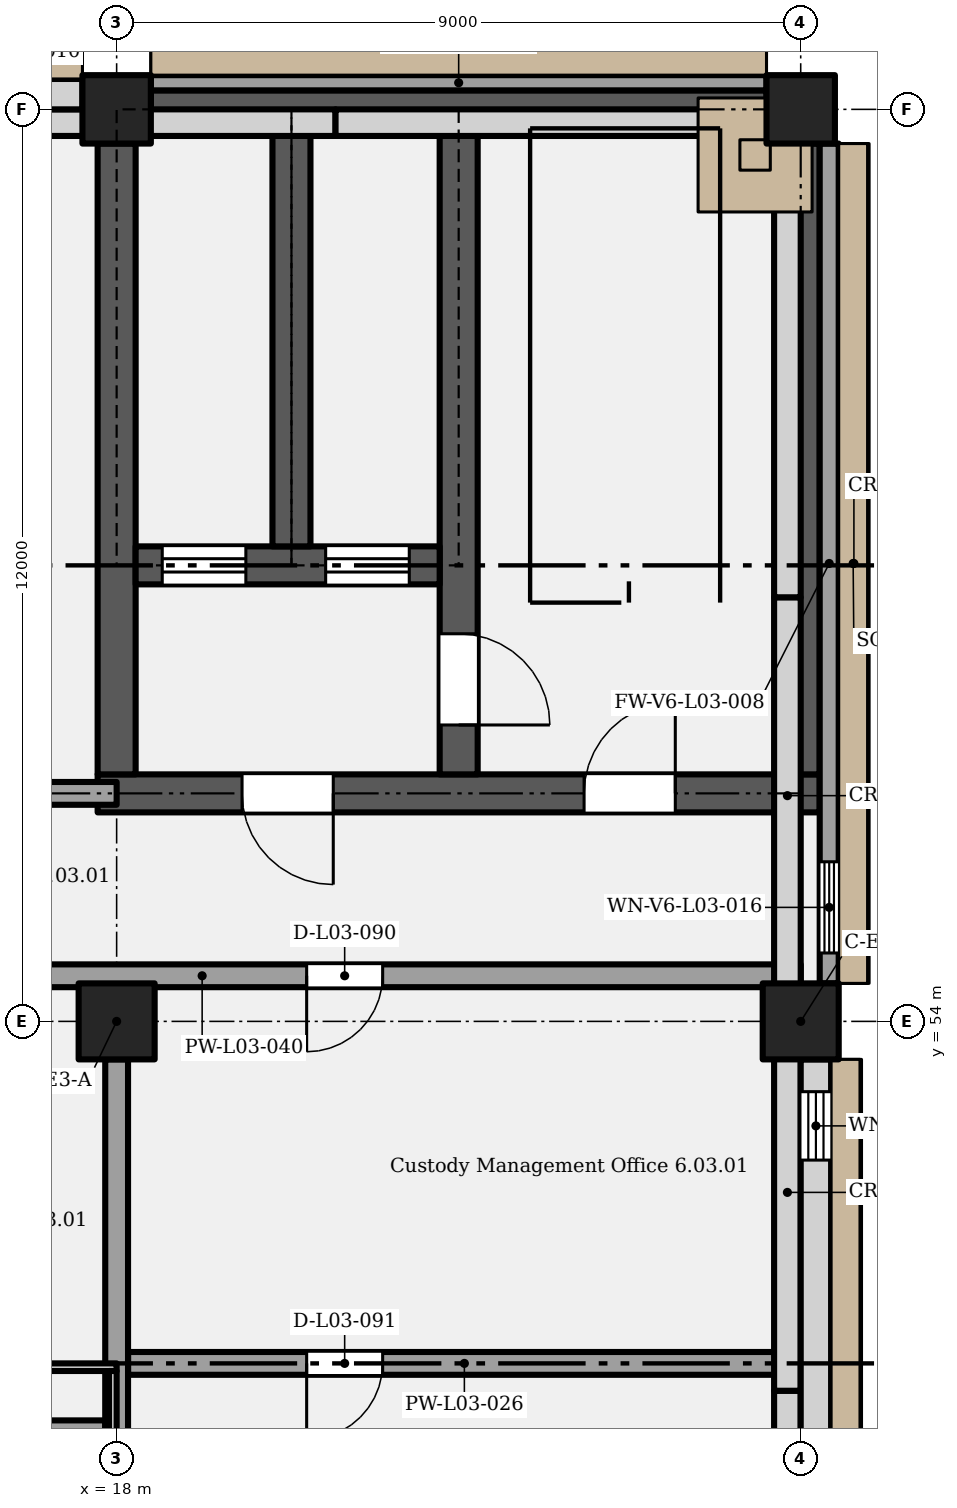
"""IFC4 building model, lengths in metres.
Left out: names, types, materials, properties, quantities, classifications, styles, units other than length and angle.
Written with IfcOpenShell. Run it as: python <this file> out.ifc"""

import sys

from ifc_helpers import new_model, si_unit, direction, frame, frame_2d, origin, origin_2d, place, context, subcontext, project, spatial, rectangle, extrude, element, fill, save


model = new_model("IFC4")
c1 = context("Model", 3, precision=1e-05, world=origin(), true_north=direction((0.0, 1.0)))
c2 = subcontext(c1, "Body", "Model", "MODEL_VIEW")
j1 = project(units=[si_unit("LENGTHUNIT", "METRE"), si_unit("PLANEANGLEUNIT", "RADIAN")], contexts=[c1])
p1 = place(None, origin())
s1 = spatial("IfcSite", under=j1, at=p1, CompositionType="ELEMENT")
p2 = place(p1, origin())
s2 = spatial("IfcBuilding", under=s1, at=p2, CompositionType="ELEMENT")
p3 = place(p2, frame((0.0, 0.0, 17.4)))
s3 = spatial("IfcBuildingStorey", under=s2, at=p3, CompositionType="ELEMENT", Elevation=17.4)
for number, where, z_axis, x_axis in (
    (1, (18.0, 54.0, 0.0), (0.0, 0.0, 1.0), (1.0, 0.0, 0.0)),
    (2, (27.0, 54.0, 0.0), (0.0, 0.0, 1.0), (1.0, 0.0, 0.0)),
):
    element("IfcColumn", number, at=place(p3, frame(where, z_axis=z_axis, x_axis=x_axis)), inside=s3, PredefinedType="COLUMN", context=c2, shape_type="SweptSolid", body=[
        extrude(rectangle(XDim=1.0, YDim=1.0, at=origin_2d()), origin(), (0.0, 0.0, 1.0), 5.4),
    ])
for number, where, z_axis, x_axis in (
    (3, (18.0, 66.0, 0.0), (0.0, 0.0, 1.0), (1.0, 0.0, 0.0)),
    (4, (27.0, 66.0, 0.0), (0.0, 0.0, 1.0), (1.0, 0.0, 0.0)),
):
    element("IfcColumn", number, at=place(p3, frame(where, z_axis=z_axis, x_axis=x_axis)), inside=s3, PredefinedType="COLUMN", context=c2, shape_type="SweptSolid", body=[
        extrude(rectangle(XDim=0.9, YDim=0.9, at=origin_2d()), origin(), (0.0, 0.0, 1.0), 5.4),
    ])
p4 = place(p3, frame((17.75, 57.0, 0.0), z_axis=(0.0, 0.0, 1.0), x_axis=(1.0, 0.0, 0.0)))
e5 = element("IfcWall", 5, at=p4, inside=s3, PredefinedType="SHEAR", context=c2, shape_type="SweptSolid", body=[
    extrude(rectangle(XDim=9.5, YDim=0.5, at=frame_2d((4.75, 0.0))), origin(), (0.0, 0.0, 1.0), 5.15),
])
p5 = place(p4, frame((3.1, 0.0, 0.0), z_axis=(0.0, 0.0, 1.0), x_axis=(-1.0, 0.0, 0.0)))
e6 = element("IfcOpeningElement", 6, at=p5, cuts=e5, PredefinedType="OPENING", context=c2, shape_type="SweptSolid", body=[
    extrude(rectangle(XDim=1.2, YDim=2.1, at=frame_2d((0.6, 1.05))), frame((0.0, 0.26, 0.0), z_axis=(0.0, -1.0, 0.0), x_axis=(1.0, 0.0, 0.0)), (0.0, 0.0, 1.0), 0.52),
])
p6 = place(p4, frame((6.4, 0.0, 0.0)))
e7 = element("IfcOpeningElement", 7, at=p6, cuts=e5, PredefinedType="OPENING", context=c2, shape_type="SweptSolid", body=[
    extrude(rectangle(XDim=1.2, YDim=2.1, at=frame_2d((0.6, 1.05))), frame((0.0, 0.26, 0.0), z_axis=(0.0, -1.0, 0.0), x_axis=(1.0, 0.0, 0.0)), (0.0, 0.0, 1.0), 0.52),
])
p7 = place(p3, frame((18.0, 57.25, 0.0), z_axis=(0.0, 0.0, 1.0), x_axis=(0.0, 1.0, 0.0)))
e8 = element("IfcWall", 8, at=p7, inside=s3, PredefinedType="SHEAR", context=c2, shape_type="SweptSolid", body=[
    extrude(rectangle(XDim=8.3, YDim=0.5, at=frame_2d((4.15, 0.0))), origin(), (0.0, 0.0, 1.0), 5.15),
])
p8 = place(p3, frame((22.5, 57.25, 0.0), z_axis=(0.0, 0.0, 1.0), x_axis=(0.0, 1.0, 0.0)))
e9 = element("IfcWall", 9, at=p8, inside=s3, PredefinedType="SHEAR", context=c2, shape_type="SweptSolid", body=[
    extrude(rectangle(XDim=8.5, YDim=0.5, at=frame_2d((4.25, 0.0))), origin(), (0.0, 0.0, 1.0), 5.15),
])
p9 = place(p8, frame((1.85, 0.0, 0.0), z_axis=(0.0, 0.0, 1.0), x_axis=(-1.0, 0.0, 0.0)))
e10 = element("IfcOpeningElement", 10, at=p9, cuts=e9, PredefinedType="OPENING", context=c2, shape_type="SweptSolid", body=[
    extrude(rectangle(XDim=1.2, YDim=2.1, at=frame_2d((0.6, 1.05))), frame((0.0, 0.26, 0.0), z_axis=(0.0, -1.0, 0.0), x_axis=(1.0, 0.0, 0.0)), (0.0, 0.0, 1.0), 0.52),
])
p10 = place(p3, frame((27.0, 57.25, 0.0), z_axis=(0.0, 0.0, 1.0), x_axis=(0.0, 1.0, 0.0)))
e11 = element("IfcWall", 11, at=p10, inside=s3, PredefinedType="SHEAR", context=c2, shape_type="SweptSolid", body=[
    extrude(rectangle(XDim=8.3, YDim=0.5, at=frame_2d((4.15, 0.0))), origin(), (0.0, 0.0, 1.0), 5.15),
])
p11 = place(p3, frame((18.25, 60.0, 0.0), z_axis=(0.0, 0.0, 1.0), x_axis=(1.0, 0.0, 0.0)))
e12 = element("IfcWall", 12, at=p11, inside=s3, PredefinedType="SHEAR", context=c2, shape_type="SweptSolid", body=[
    extrude(rectangle(XDim=4.0, YDim=0.5, at=frame_2d((2.0, 0.0))), origin(), (0.0, 0.0, 1.0), 5.15),
])
p12 = place(p11, frame((0.35, 0.0, 0.0)))
e13 = element("IfcOpeningElement", 13, at=p12, cuts=e12, PredefinedType="OPENING", context=c2, shape_type="SweptSolid", body=[
    extrude(rectangle(XDim=1.1, YDim=2.1, at=frame_2d((0.55, 1.05))), frame((0.0, 0.26, 0.0), z_axis=(0.0, -1.0, 0.0), x_axis=(1.0, 0.0, 0.0)), (0.0, 0.0, 1.0), 0.52),
])
p13 = place(p11, frame((2.5, 0.0, 0.0)))
e14 = element("IfcOpeningElement", 14, at=p13, cuts=e12, PredefinedType="OPENING", context=c2, shape_type="SweptSolid", body=[
    extrude(rectangle(XDim=1.1, YDim=2.1, at=frame_2d((0.55, 1.05))), frame((0.0, 0.26, 0.0), z_axis=(0.0, -1.0, 0.0), x_axis=(1.0, 0.0, 0.0)), (0.0, 0.0, 1.0), 0.52),
])
p14 = place(p3, frame((20.3, 60.25, 0.0), z_axis=(0.0, 0.0, 1.0), x_axis=(0.0, 1.0, 0.0)))
e15 = element("IfcWall", 15, at=p14, inside=s3, PredefinedType="SHEAR", context=c2, shape_type="SweptSolid", body=[
    extrude(rectangle(XDim=5.5, YDim=0.5, at=frame_2d((2.75, 0.0))), origin(), (0.0, 0.0, 1.0), 5.15),
])
p15 = place(p3, frame((18.45, 66.0, 0.0), z_axis=(0.0, 0.0, 1.0), x_axis=(1.0, 0.0, 0.0)))
e16 = element("IfcWall", 16, at=p15, inside=s3, PredefinedType="SHEAR", context=c2, shape_type="SweptSolid", body=[
    extrude(rectangle(XDim=8.1, YDim=0.5, at=frame_2d((4.05, 0.0))), origin(), (0.0, 0.0, 1.0), 5.15),
])
p16 = place(p3, frame((9.45, 66.2, 0.0), z_axis=(0.0, 0.0, 1.0), x_axis=(1.0, 0.0, 0.0)))
e17 = element("IfcWall", 17, at=p16, inside=s3, PredefinedType="SOLIDWALL", context=c2, shape_type="SweptSolid", body=[
    extrude(rectangle(XDim=8.1, YDim=0.4, at=frame_2d((4.05, 0.0))), origin(), (0.0, 0.0, 1.0), 5.15),
])
p17 = place(p16, frame((0.6, 0.0, 1.5)))
e18 = element("IfcOpeningElement", 18, at=p17, cuts=e17, PredefinedType="OPENING", context=c2, shape_type="SweptSolid", body=[
    extrude(rectangle(XDim=0.9, YDim=1.8, at=frame_2d((0.45, 0.9))), frame((0.0, 0.21, 0.0), z_axis=(0.0, -1.0, 0.0), x_axis=(1.0, 0.0, 0.0)), (0.0, 0.0, 1.0), 0.42),
])
p18 = place(p16, frame((3.6, 0.0, 1.5)))
e19 = element("IfcOpeningElement", 19, at=p18, cuts=e17, PredefinedType="OPENING", context=c2, shape_type="SweptSolid", body=[
    extrude(rectangle(XDim=0.9, YDim=1.8, at=frame_2d((0.45, 0.9))), frame((0.0, 0.21, 0.0), z_axis=(0.0, -1.0, 0.0), x_axis=(1.0, 0.0, 0.0)), (0.0, 0.0, 1.0), 0.42),
])
p19 = place(p16, frame((6.6, 0.0, 1.5)))
e20 = element("IfcOpeningElement", 20, at=p19, cuts=e17, PredefinedType="OPENING", context=c2, shape_type="SweptSolid", body=[
    extrude(rectangle(XDim=0.9, YDim=1.8, at=frame_2d((0.45, 0.9))), frame((0.0, 0.21, 0.0), z_axis=(0.0, -1.0, 0.0), x_axis=(1.0, 0.0, 0.0)), (0.0, 0.0, 1.0), 0.42),
])
p20 = place(p3, frame((18.45, 66.35, 0.0), z_axis=(0.0, 0.0, 1.0), x_axis=(1.0, 0.0, 0.0)))
e21 = element("IfcWall", 21, at=p20, inside=s3, PredefinedType="SOLIDWALL", context=c2, shape_type="SweptSolid", body=[
    extrude(rectangle(XDim=8.1, YDim=0.2, at=frame_2d((4.05, 0.0))), origin(), (0.0, 0.0, 1.0), 5.15),
])
p21 = place(p3, frame((27.2, 38.0, 0.0), z_axis=(0.0, 0.0, 1.0), x_axis=(0.0, 1.0, 0.0)))
e22 = element("IfcWall", 22, at=p21, inside=s3, PredefinedType="SOLIDWALL", context=c2, shape_type="SweptSolid", body=[
    extrude(rectangle(XDim=15.5, YDim=0.4, at=frame_2d((7.75, 0.0))), origin(), (0.0, 0.0, 1.0), 5.15),
])
p22 = place(p21, frame((0.425, 0.0, 1.5)))
e23 = element("IfcOpeningElement", 23, at=p22, cuts=e22, PredefinedType="OPENING", context=c2, shape_type="SweptSolid", body=[
    extrude(rectangle(XDim=0.9, YDim=1.8, at=frame_2d((0.45, 0.9))), frame((0.0, 0.21, 0.0), z_axis=(0.0, -1.0, 0.0), x_axis=(1.0, 0.0, 0.0)), (0.0, 0.0, 1.0), 0.42),
])
p23 = place(p21, frame((3.175, 0.0, 1.5)))
e24 = element("IfcOpeningElement", 24, at=p23, cuts=e22, PredefinedType="OPENING", context=c2, shape_type="SweptSolid", body=[
    extrude(rectangle(XDim=0.9, YDim=1.8, at=frame_2d((0.45, 0.9))), frame((0.0, 0.21, 0.0), z_axis=(0.0, -1.0, 0.0), x_axis=(1.0, 0.0, 0.0)), (0.0, 0.0, 1.0), 0.42),
])
p24 = place(p21, frame((5.845, 0.0, 1.5)))
e25 = element("IfcOpeningElement", 25, at=p24, cuts=e22, PredefinedType="OPENING", context=c2, shape_type="SweptSolid", body=[
    extrude(rectangle(XDim=0.9, YDim=1.8, at=frame_2d((0.45, 0.9))), frame((0.0, 0.21, 0.0), z_axis=(0.0, -1.0, 0.0), x_axis=(1.0, 0.0, 0.0)), (0.0, 0.0, 1.0), 0.42),
])
p25 = place(p21, frame((8.675, 0.0, 1.5)))
e26 = element("IfcOpeningElement", 26, at=p25, cuts=e22, PredefinedType="OPENING", context=c2, shape_type="SweptSolid", body=[
    extrude(rectangle(XDim=0.9, YDim=1.8, at=frame_2d((0.45, 0.9))), frame((0.0, 0.21, 0.0), z_axis=(0.0, -1.0, 0.0), x_axis=(1.0, 0.0, 0.0)), (0.0, 0.0, 1.0), 0.42),
])
p26 = place(p21, frame((14.175, 0.0, 1.5)))
e27 = element("IfcOpeningElement", 27, at=p26, cuts=e22, PredefinedType="OPENING", context=c2, shape_type="SweptSolid", body=[
    extrude(rectangle(XDim=0.9, YDim=1.8, at=frame_2d((0.45, 0.9))), frame((0.0, 0.21, 0.0), z_axis=(0.0, -1.0, 0.0), x_axis=(1.0, 0.0, 0.0)), (0.0, 0.0, 1.0), 0.42),
])
p27 = place(p3, frame((27.375, 54.5, 0.0), z_axis=(0.0, 0.0, 1.0), x_axis=(0.0, 1.0, 0.0)))
e28 = element("IfcWall", 28, at=p27, inside=s3, PredefinedType="SOLIDWALL", context=c2, shape_type="SweptSolid", body=[
    extrude(rectangle(XDim=11.05, YDim=0.25, at=frame_2d((5.525, 0.0))), origin(), (0.0, 0.0, 1.0), 5.15),
])
p28 = place(p27, frame((0.4, 0.0, 0.9)))
e29 = element("IfcOpeningElement", 29, at=p28, cuts=e28, PredefinedType="OPENING", context=c2, shape_type="SweptSolid", body=[
    extrude(rectangle(XDim=1.2, YDim=2.4, at=frame_2d((0.6, 1.2))), frame((0.0, 0.135, 0.0), z_axis=(0.0, -1.0, 0.0), x_axis=(1.0, 0.0, 0.0)), (0.0, 0.0, 1.0), 0.27),
])
p29 = place(p3, frame((25.8, 65.4, 5.4), z_axis=(0.0, 0.0, 1.0), x_axis=(1.0, 0.0, 0.0)))
e30 = element("IfcWall", 30, at=p29, inside=s3, PredefinedType="SOLIDWALL", context=c2, shape_type="SweptSolid", body=[
    extrude(rectangle(XDim=1.2, YDim=1.2, at=frame_2d((0.6, 0.0))), origin(), (0.0, 0.0, 1.0), 2.4),
])
p30 = place(p3, frame((15.96, 65.825, 5.4), z_axis=(0.0, 0.0, 1.0), x_axis=(1.0, 0.0, 0.0)))
e31 = element("IfcWall", 31, at=p30, inside=s3, PredefinedType="PARAPET", context=c2, shape_type="SweptSolid", body=[
    extrude(rectangle(XDim=4.92, YDim=0.35, at=frame_2d((2.46, 0.0))), origin(), (0.0, 0.0, 1.0), 1.5),
])
p31 = place(p3, frame((20.88, 65.825, 5.4), z_axis=(0.0, 0.0, 1.0), x_axis=(1.0, 0.0, 0.0)))
e32 = element("IfcWall", 32, at=p31, inside=s3, PredefinedType="PARAPET", context=c2, shape_type="SweptSolid", body=[
    extrude(rectangle(XDim=4.92, YDim=0.35, at=frame_2d((2.46, 0.0))), origin(), (0.0, 0.0, 1.0), 1.2),
])
p32 = place(p3, frame((26.825, 43.92, 5.4), z_axis=(0.0, 0.0, 1.0), x_axis=(0.0, 1.0, 0.0)))
e33 = element("IfcWall", 33, at=p32, inside=s3, PredefinedType="PARAPET", context=c2, shape_type="SweptSolid", body=[
    extrude(rectangle(XDim=5.22, YDim=0.35, at=frame_2d((2.61, 0.0))), origin(), (0.0, 0.0, 1.0), 1.5),
])
p33 = place(p3, frame((26.825, 49.14, 5.4), z_axis=(0.0, 0.0, 1.0), x_axis=(0.0, 1.0, 0.0)))
e34 = element("IfcWall", 34, at=p33, inside=s3, PredefinedType="PARAPET", context=c2, shape_type="SweptSolid", body=[
    extrude(rectangle(XDim=5.22, YDim=0.35, at=frame_2d((2.61, 0.0))), origin(), (0.0, 0.0, 1.0), 1.8),
])
p34 = place(p3, frame((26.825, 54.36, 5.4), z_axis=(0.0, 0.0, 1.0), x_axis=(0.0, 1.0, 0.0)))
e35 = element("IfcWall", 35, at=p34, inside=s3, PredefinedType="PARAPET", context=c2, shape_type="SweptSolid", body=[
    extrude(rectangle(XDim=5.22, YDim=0.35, at=frame_2d((2.61, 0.0))), origin(), (0.0, 0.0, 1.0), 1.5),
])
p35 = place(p3, frame((26.825, 59.58, 5.4), z_axis=(0.0, 0.0, 1.0), x_axis=(0.0, 1.0, 0.0)))
e36 = element("IfcWall", 36, at=p35, inside=s3, PredefinedType="PARAPET", context=c2, shape_type="SweptSolid", body=[
    extrude(rectangle(XDim=5.22, YDim=0.35, at=frame_2d((2.61, 0.0))), origin(), (0.0, 0.0, 1.0), 1.2),
])
p36 = place(p3, frame((9.0, 49.45, 5.4), z_axis=(0.0, 0.0, 1.0), x_axis=(1.0, 0.0, 0.0)))
e37 = element("IfcWall", 37, at=p36, inside=s3, PredefinedType="SOLIDWALL", context=c2, shape_type="SweptSolid", body=[
    extrude(rectangle(XDim=9.0, YDim=0.1, at=frame_2d((4.5, 0.0))), origin(), (0.0, 0.0, 1.0), 2.4),
])
p37 = place(p3, frame((17.95, 40.5, 5.4), z_axis=(0.0, 0.0, 1.0), x_axis=(0.0, 1.0, 0.0)))
e38 = element("IfcWall", 38, at=p37, inside=s3, PredefinedType="SOLIDWALL", context=c2, shape_type="SweptSolid", body=[
    extrude(rectangle(XDim=8.9, YDim=0.1, at=frame_2d((4.45, 0.0))), origin(), (0.0, 0.0, 1.0), 2.4),
])
p38 = place(p3, frame((11.55, 48.6, 0.0), z_axis=(0.0, 0.0, 1.0), x_axis=(1.0, 0.0, 0.0)))
e39 = element("IfcWall", 39, at=p38, inside=s3, PredefinedType="PARTITIONING", context=c2, shape_type="SweptSolid", body=[
    extrude(rectangle(XDim=6.3, YDim=0.3, at=frame_2d((3.15, 0.0))), origin(), (0.0, 0.0, 1.0), 5.15),
])
p39 = place(p3, frame((18.15, 49.5, 0.0), z_axis=(0.0, 0.0, 1.0), x_axis=(1.0, 0.0, 0.0)))
e40 = element("IfcWall", 40, at=p39, inside=s3, PredefinedType="PARTITIONING", context=c2, shape_type="SweptSolid", body=[
    extrude(rectangle(XDim=8.85, YDim=0.3, at=frame_2d((4.425, 0.0))), origin(), (0.0, 0.0, 1.0), 5.15),
])
p40 = place(p39, frame((3.35, 0.0, 0.0), z_axis=(0.0, 0.0, 1.0), x_axis=(-1.0, 0.0, 0.0)))
e41 = element("IfcOpeningElement", 41, at=p40, cuts=e40, PredefinedType="OPENING", context=c2, shape_type="SweptSolid", body=[
    extrude(rectangle(XDim=1.0, YDim=2.1, at=frame_2d((0.5, 1.05))), frame((0.0, 0.16, 0.0), z_axis=(0.0, -1.0, 0.0), x_axis=(1.0, 0.0, 0.0)), (0.0, 0.0, 1.0), 0.32),
])
p41 = place(p3, frame((11.25, 54.6, 0.0), z_axis=(0.0, 0.0, 1.0), x_axis=(1.0, 0.0, 0.0)))
e42 = element("IfcWall", 42, at=p41, inside=s3, PredefinedType="PARTITIONING", context=c2, shape_type="SweptSolid", body=[
    extrude(rectangle(XDim=15.75, YDim=0.3, at=frame_2d((7.875, 0.0))), origin(), (0.0, 0.0, 1.0), 5.15),
])
p42 = place(p41, frame((10.25, 0.0, 0.0), z_axis=(0.0, 0.0, 1.0), x_axis=(-1.0, 0.0, 0.0)))
e43 = element("IfcOpeningElement", 43, at=p42, cuts=e42, PredefinedType="OPENING", context=c2, shape_type="SweptSolid", body=[
    extrude(rectangle(XDim=1.0, YDim=2.1, at=frame_2d((0.5, 1.05))), frame((0.0, 0.16, 0.0), z_axis=(0.0, -1.0, 0.0), x_axis=(1.0, 0.0, 0.0)), (0.0, 0.0, 1.0), 0.32),
])
p43 = place(p3, frame((9.0, 57.0, 0.0), z_axis=(0.0, 0.0, 1.0), x_axis=(1.0, 0.0, 0.0)))
e44 = element("IfcWall", 44, at=p43, inside=s3, PredefinedType="PARTITIONING", context=c2, shape_type="SweptSolid", body=[
    extrude(rectangle(XDim=9.0, YDim=0.3, at=frame_2d((4.5, 0.0))), origin(), (0.0, 0.0, 1.0), 5.15),
])
p44 = place(p43, frame((3.9, 0.0, 0.0)))
e45 = element("IfcOpeningElement", 45, at=p44, cuts=e44, PredefinedType="OPENING", context=c2, shape_type="SweptSolid", body=[
    extrude(rectangle(XDim=1.2, YDim=2.1, at=frame_2d((0.6, 1.05))), frame((0.0, 0.16, 0.0), z_axis=(0.0, -1.0, 0.0), x_axis=(1.0, 0.0, 0.0)), (0.0, 0.0, 1.0), 0.32),
])
p45 = place(p3, frame((18.0, 38.0, 0.0), z_axis=(0.0, 0.0, 1.0), x_axis=(0.0, 1.0, 0.0)))
e46 = element("IfcWall", 46, at=p45, inside=s3, PredefinedType="PARTITIONING", context=c2, shape_type="SweptSolid", body=[
    extrude(rectangle(XDim=15.5, YDim=0.3, at=frame_2d((7.75, 0.0))), origin(), (0.0, 0.0, 1.0), 4.2),
])
p46 = place(p26, origin())
e47 = element("IfcWindow", 47, at=p46, inside=s3, PartitioningType="SINGLE_PANEL", PredefinedType="WINDOW", context=c2, shape_type="SweptSolid", body=[
    extrude(rectangle(XDim=0.9, YDim=1.8, at=frame_2d((0.45, 0.9))), frame((0.0, 0.03, 0.0), z_axis=(0.0, -1.0, 0.0), x_axis=(1.0, 0.0, 0.0)), (0.0, 0.0, 1.0), 0.06),
])
fill(e27, e47)
p47 = place(p28, origin())
e48 = element("IfcWindow", 48, at=p47, inside=s3, PartitioningType="SINGLE_PANEL", PredefinedType="WINDOW", context=c2, shape_type="SweptSolid", body=[
    extrude(rectangle(XDim=1.2, YDim=2.4, at=frame_2d((0.6, 1.2))), frame((0.0, 0.03, 0.0), z_axis=(0.0, -1.0, 0.0), x_axis=(1.0, 0.0, 0.0)), (0.0, 0.0, 1.0), 0.06),
])
fill(e29, e48)
p48 = place(p5, origin())
e49 = element("IfcDoor", 49, at=p48, inside=s3, OperationType="SINGLE_SWING_LEFT", PredefinedType="DOOR", context=c2, shape_type="SweptSolid", body=[
    extrude(rectangle(XDim=1.2, YDim=2.1, at=frame_2d((0.6, 1.05))), frame((0.0, 0.025, 0.0), z_axis=(0.0, -1.0, 0.0), x_axis=(1.0, 0.0, 0.0)), (0.0, 0.0, 1.0), 0.05),
])
fill(e6, e49)
p49 = place(p12, origin())
e50 = element("IfcDoor", 50, at=p49, inside=s3, OperationType="SLIDING_TO_LEFT", PredefinedType="DOOR", context=c2, shape_type="SweptSolid", body=[
    extrude(rectangle(XDim=1.1, YDim=2.1, at=frame_2d((0.55, 1.05))), frame((0.0, 0.025, 0.0), z_axis=(0.0, -1.0, 0.0), x_axis=(1.0, 0.0, 0.0)), (0.0, 0.0, 1.0), 0.05),
])
fill(e13, e50)
p50 = place(p13, origin())
e51 = element("IfcDoor", 51, at=p50, inside=s3, OperationType="SLIDING_TO_LEFT", PredefinedType="DOOR", context=c2, shape_type="SweptSolid", body=[
    extrude(rectangle(XDim=1.1, YDim=2.1, at=frame_2d((0.55, 1.05))), frame((0.0, 0.025, 0.0), z_axis=(0.0, -1.0, 0.0), x_axis=(1.0, 0.0, 0.0)), (0.0, 0.0, 1.0), 0.05),
])
fill(e14, e51)
p51 = place(p9, origin())
e52 = element("IfcDoor", 52, at=p51, inside=s3, OperationType="SINGLE_SWING_RIGHT", PredefinedType="DOOR", context=c2, shape_type="SweptSolid", body=[
    extrude(rectangle(XDim=1.2, YDim=2.1, at=frame_2d((0.6, 1.05))), frame((0.0, 0.025, 0.0), z_axis=(0.0, -1.0, 0.0), x_axis=(1.0, 0.0, 0.0)), (0.0, 0.0, 1.0), 0.05),
])
fill(e10, e52)
p52 = place(p6, origin())
e53 = element("IfcDoor", 53, at=p52, inside=s3, OperationType="SINGLE_SWING_RIGHT", PredefinedType="DOOR", context=c2, shape_type="SweptSolid", body=[
    extrude(rectangle(XDim=1.2, YDim=2.1, at=frame_2d((0.6, 1.05))), frame((0.0, 0.025, 0.0), z_axis=(0.0, -1.0, 0.0), x_axis=(1.0, 0.0, 0.0)), (0.0, 0.0, 1.0), 0.05),
])
fill(e7, e53)
p53 = place(p42, origin())
e54 = element("IfcDoor", 54, at=p53, inside=s3, OperationType="SINGLE_SWING_RIGHT", PredefinedType="DOOR", context=c2, shape_type="SweptSolid", body=[
    extrude(rectangle(XDim=1.0, YDim=2.1, at=frame_2d((0.5, 1.05))), frame((0.0, 0.025, 0.0), z_axis=(0.0, -1.0, 0.0), x_axis=(1.0, 0.0, 0.0)), (0.0, 0.0, 1.0), 0.05),
])
fill(e43, e54)
p54 = place(p40, origin())
e55 = element("IfcDoor", 55, at=p54, inside=s3, OperationType="SINGLE_SWING_RIGHT", PredefinedType="DOOR", context=c2, shape_type="SweptSolid", body=[
    extrude(rectangle(XDim=1.0, YDim=2.1, at=frame_2d((0.5, 1.05))), frame((0.0, 0.025, 0.0), z_axis=(0.0, -1.0, 0.0), x_axis=(1.0, 0.0, 0.0)), (0.0, 0.0, 1.0), 0.05),
])
fill(e41, e55)
save(model, sys.argv[1])
